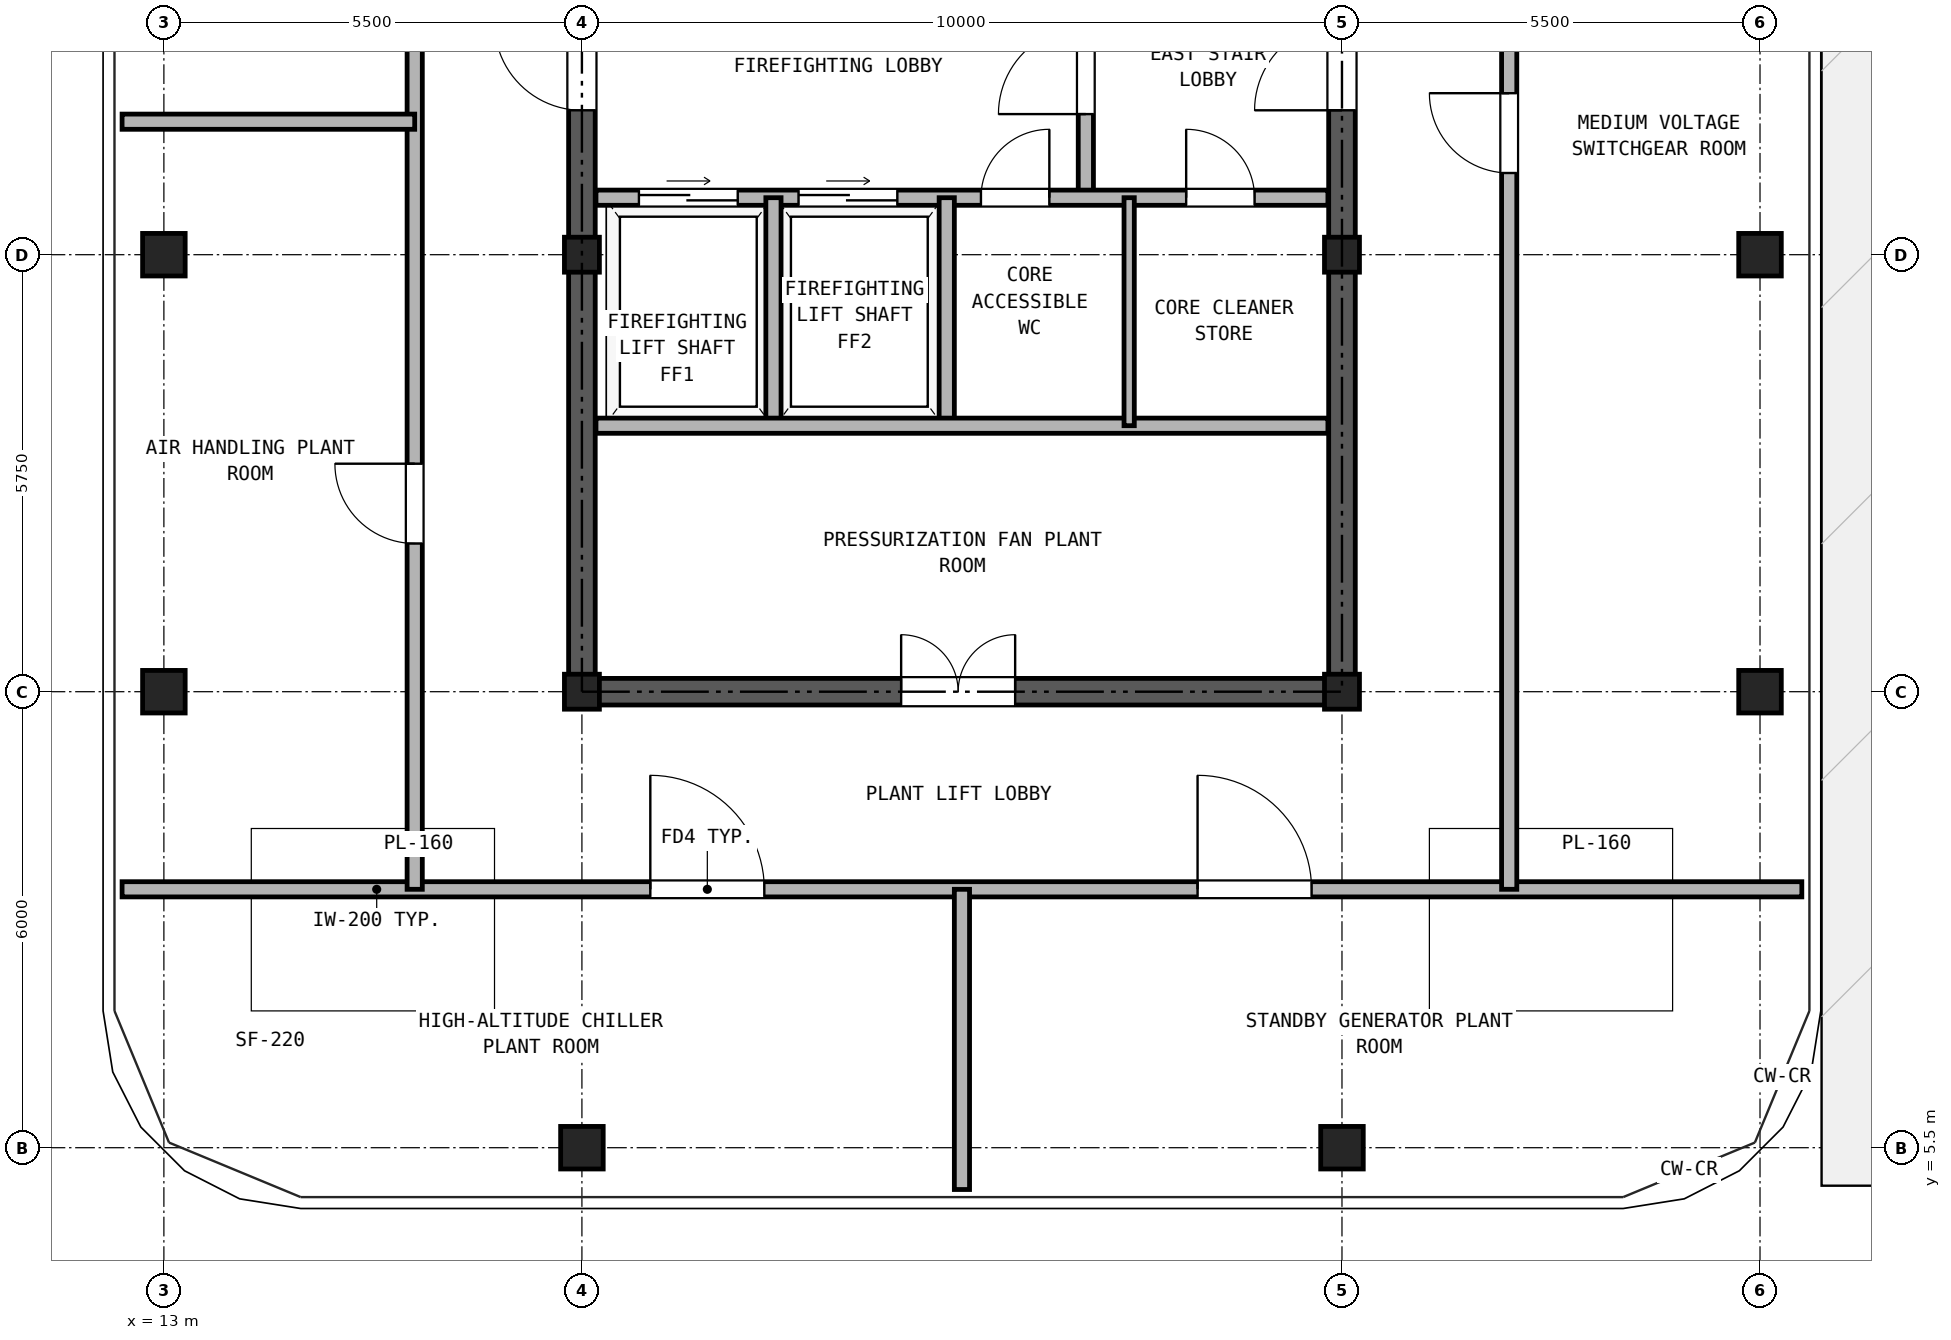
"""IFC4 building model, lengths in metres.
Left out: names, types, materials, properties, quantities, classifications, styles, units other than length and angle.
Written with IfcOpenShell. Run it as: python <this file> out.ifc"""

import sys

from ifc_helpers import new_model, si_unit, direction, frame, frame_2d, origin, origin_2d, place, context, subcontext, project, spatial, rectangle, hollow_rectangle, extrude, source, transform, mapped, element, fill, save


model = new_model("IFC4")
c1 = context("Model", 3, precision=1e-05, world=origin(), true_north=direction((0.0, 1.0)))
c2 = subcontext(c1, "Body", "Model", "MODEL_VIEW")
j1 = project(units=[si_unit("LENGTHUNIT", "METRE"), si_unit("PLANEANGLEUNIT", "RADIAN")], contexts=[c1])
p1 = place(None, origin())
s1 = spatial("IfcSite", under=j1, at=p1, CompositionType="ELEMENT")
p2 = place(p1, origin())
s2 = spatial("IfcBuilding", under=s1, at=p2, CompositionType="ELEMENT")
p3 = place(p2, frame((0.0, 0.0, 285.7)))
s3 = spatial("IfcBuildingStorey", under=s2, at=p3, CompositionType="ELEMENT", Elevation=285.7)
m1 = source(origin(), c2, "Body", "SweptSolid", [
    extrude(hollow_rectangle(XDim=0.56, YDim=0.56, WallThickness=0.03, at=origin_2d()), origin(), (0.0, 0.0, 1.0), 3.38),
])
for number, where, z_axis, x_axis in (
    (1, (18.5, 5.5, 0.0), (0.0, 0.0, 1.0), (1.0, 0.0, 0.0)),
    (2, (28.5, 5.5, 0.0), (0.0, 0.0, 1.0), (1.0, 0.0, 0.0)),
    (3, (13.0, 11.5, 0.0), (0.0, 0.0, 1.0), (1.0, 0.0, 0.0)),
    (4, (34.0, 11.5, 0.0), (0.0, 0.0, 1.0), (1.0, 0.0, 0.0)),
    (5, (13.0, 17.25, 0.0), (0.0, 0.0, 1.0), (1.0, 0.0, 0.0)),
    (6, (34.0, 17.25, 0.0), (0.0, 0.0, 1.0), (1.0, 0.0, 0.0)),
):
    element("IfcColumn", number, at=place(p3, frame(where, z_axis=z_axis, x_axis=x_axis)), inside=s3, PredefinedType="COLUMN", context=c2, shape_type="MappedRepresentation", body=[
        mapped(m1, transform((0.0, 0.0, 0.0), x_axis=(1.0, 0.0, 0.0), y_axis=(0.0, 1.0, 0.0), z_axis=(0.0, 0.0, 1.0), scale=1.0)),
    ])
m2 = source(origin(), c2, "Body", "SweptSolid", [
    extrude(hollow_rectangle(XDim=0.46, YDim=0.46, WallThickness=0.025, at=origin_2d()), origin(), (0.0, 0.0, 1.0), 3.38),
])
for number, where, z_axis, x_axis in (
    (7, (18.5, 11.5, 0.0), (0.0, 0.0, 1.0), (1.0, 0.0, 0.0)),
    (8, (18.5, 17.25, 0.0), (0.0, 0.0, 1.0), (1.0, 0.0, 0.0)),
    (9, (28.5, 11.5, 0.0), (0.0, 0.0, 1.0), (1.0, 0.0, 0.0)),
    (10, (28.5, 17.25, 0.0), (0.0, 0.0, 1.0), (1.0, 0.0, 0.0)),
):
    element("IfcColumn", number, at=place(p3, frame(where, z_axis=z_axis, x_axis=x_axis)), inside=s3, PredefinedType="COLUMN", context=c2, shape_type="MappedRepresentation", body=[
        mapped(m2, transform((0.0, 0.0, 0.0), x_axis=(1.0, 0.0, 0.0), y_axis=(0.0, 1.0, 0.0), z_axis=(0.0, 0.0, 1.0), scale=1.0)),
    ])
p4 = place(p3, frame((18.325, 11.5, 0.0), z_axis=(0.0, 0.0, 1.0), x_axis=(1.0, 0.0, 0.0)))
e11 = element("IfcWall", 11, at=p4, inside=s3, PredefinedType="SHEAR", context=c2, shape_type="SweptSolid", body=[
    extrude(rectangle(XDim=10.35, YDim=0.35, at=frame_2d((5.175, 0.0))), origin(), (0.0, 0.0, 1.0), 3.38),
])
p5 = place(p4, frame((4.375, 0.0, 0.0)))
e12 = element("IfcOpeningElement", 12, at=p5, cuts=e11, PredefinedType="OPENING", context=c2, shape_type="SweptSolid", body=[
    extrude(rectangle(XDim=1.5, YDim=2.25, at=frame_2d((0.75, 1.125))), frame((0.0, 0.185, 0.0), z_axis=(0.0, -1.0, 0.0), x_axis=(1.0, 0.0, 0.0)), (0.0, 0.0, 1.0), 0.37),
])
p6 = place(p3, frame((18.5, 11.675, 0.0), z_axis=(0.0, 0.0, 1.0), x_axis=(0.0, 1.0, 0.0)))
e13 = element("IfcWall", 13, at=p6, inside=s3, PredefinedType="SHEAR", context=c2, shape_type="SweptSolid", body=[
    extrude(rectangle(XDim=16.9, YDim=0.35, at=frame_2d((8.45, 0.0))), origin(), (0.0, 0.0, 1.0), 3.38),
])
p7 = place(p6, frame((7.475, 0.0, 0.0)))
e14 = element("IfcOpeningElement", 14, at=p7, cuts=e13, PredefinedType="OPENING", context=c2, shape_type="SweptSolid", body=[
    extrude(rectangle(XDim=1.15, YDim=2.2, at=frame_2d((0.575, 1.1))), frame((0.0, 0.185, 0.0), z_axis=(0.0, -1.0, 0.0), x_axis=(1.0, 0.0, 0.0)), (0.0, 0.0, 1.0), 0.37),
])
p8 = place(p3, frame((28.5, 11.675, 0.0), z_axis=(0.0, 0.0, 1.0), x_axis=(0.0, 1.0, 0.0)))
e15 = element("IfcWall", 15, at=p8, inside=s3, PredefinedType="SHEAR", context=c2, shape_type="SweptSolid", body=[
    extrude(rectangle(XDim=16.9, YDim=0.35, at=frame_2d((8.45, 0.0))), origin(), (0.0, 0.0, 1.0), 3.38),
])
p9 = place(p8, frame((7.475, 0.0, 0.0)))
e16 = element("IfcOpeningElement", 16, at=p9, cuts=e15, PredefinedType="OPENING", context=c2, shape_type="SweptSolid", body=[
    extrude(rectangle(XDim=1.15, YDim=2.2, at=frame_2d((0.575, 1.1))), frame((0.0, 0.185, 0.0), z_axis=(0.0, -1.0, 0.0), x_axis=(1.0, 0.0, 0.0)), (0.0, 0.0, 1.0), 0.37),
])
p10 = place(p3, frame((25.13, 18.0, 0.0), z_axis=(0.0, 0.0, 1.0), x_axis=(0.0, 1.0, 0.0)))
e17 = element("IfcWall", 17, at=p10, inside=s3, PredefinedType="PARTITIONING", context=c2, shape_type="SweptSolid", body=[
    extrude(rectangle(XDim=3.39, YDim=0.2, at=frame_2d((1.695, 0.0))), origin(), (0.0, 0.0, 1.0), 3.38),
])
p11 = place(p10, frame((1.1, 0.0, 0.0)))
e18 = element("IfcOpeningElement", 18, at=p11, cuts=e17, PredefinedType="OPENING", context=c2, shape_type="SweptSolid", body=[
    extrude(rectangle(XDim=1.15, YDim=2.2, at=frame_2d((0.575, 1.1))), frame((0.0, 0.11, 0.0), z_axis=(0.0, -1.0, 0.0), x_axis=(1.0, 0.0, 0.0)), (0.0, 0.0, 1.0), 0.22),
])
p12 = place(p3, frame((18.685, 18.0, 0.0), z_axis=(0.0, 0.0, 1.0), x_axis=(1.0, 0.0, 0.0)))
e19 = element("IfcWall", 19, at=p12, inside=s3, PredefinedType="PARTITIONING", context=c2, shape_type="SweptSolid", body=[
    extrude(rectangle(XDim=9.63, YDim=0.2, at=frame_2d((4.815, 0.0))), origin(), (0.0, 0.0, 1.0), 3.38),
])
p13 = place(p12, frame((0.565, 0.0, 0.0)))
e20 = element("IfcOpeningElement", 20, at=p13, cuts=e19, PredefinedType="OPENING", context=c2, shape_type="SweptSolid", body=[
    extrude(rectangle(XDim=1.3, YDim=2.3, at=frame_2d((0.65, 1.15))), frame((0.0, 0.11, 0.0), z_axis=(0.0, -1.0, 0.0), x_axis=(1.0, 0.0, 0.0)), (0.0, 0.0, 1.0), 0.22),
])
p14 = place(p12, frame((2.665, 0.0, 0.0)))
e21 = element("IfcOpeningElement", 21, at=p14, cuts=e19, PredefinedType="OPENING", context=c2, shape_type="SweptSolid", body=[
    extrude(rectangle(XDim=1.3, YDim=2.3, at=frame_2d((0.65, 1.15))), frame((0.0, 0.11, 0.0), z_axis=(0.0, -1.0, 0.0), x_axis=(1.0, 0.0, 0.0)), (0.0, 0.0, 1.0), 0.22),
])
p15 = place(p12, frame((5.065, 0.0, 0.0)))
e22 = element("IfcOpeningElement", 22, at=p15, cuts=e19, PredefinedType="OPENING", context=c2, shape_type="SweptSolid", body=[
    extrude(rectangle(XDim=0.9, YDim=2.05, at=frame_2d((0.45, 1.025))), frame((0.0, 0.11, 0.0), z_axis=(0.0, -1.0, 0.0), x_axis=(1.0, 0.0, 0.0)), (0.0, 0.0, 1.0), 0.22),
])
p16 = place(p12, frame((7.765, 0.0, 0.0)))
e23 = element("IfcOpeningElement", 23, at=p16, cuts=e19, PredefinedType="OPENING", context=c2, shape_type="SweptSolid", body=[
    extrude(rectangle(XDim=0.9, YDim=2.05, at=frame_2d((0.45, 1.025))), frame((0.0, 0.11, 0.0), z_axis=(0.0, -1.0, 0.0), x_axis=(1.0, 0.0, 0.0)), (0.0, 0.0, 1.0), 0.22),
])
for number, where, z_axis, x_axis in (
    (24, (21.02, 15.0, 0.0), (0.0, 0.0, 1.0), (0.0, 1.0, 0.0)),
    (25, (23.3, 15.0, 0.0), (0.0, 0.0, 1.0), (0.0, 1.0, 0.0)),
):
    element("IfcWall", number, at=place(p3, frame(where, z_axis=z_axis, x_axis=x_axis)), inside=s3, PredefinedType="PARTITIONING", context=c2, shape_type="SweptSolid", body=[
        extrude(rectangle(XDim=3.0, YDim=0.2, at=frame_2d((1.5, 0.0))), origin(), (0.0, 0.0, 1.0), 3.38),
    ])
p17 = place(p3, frame((18.685, 15.0, 0.0), z_axis=(0.0, 0.0, 1.0), x_axis=(1.0, 0.0, 0.0)))
e26 = element("IfcWall", 26, at=p17, inside=s3, PredefinedType="PARTITIONING", context=c2, shape_type="SweptSolid", body=[
    extrude(rectangle(XDim=9.63, YDim=0.2, at=frame_2d((4.815, 0.0))), origin(), (0.0, 0.0, 1.0), 3.38),
])
p18 = place(p3, frame((25.7, 15.0, 0.0), z_axis=(0.0, 0.0, 1.0), x_axis=(0.0, 1.0, 0.0)))
e27 = element("IfcWall", 27, at=p18, inside=s3, PredefinedType="PARTITIONING", context=c2, shape_type="SweptSolid", body=[
    extrude(rectangle(XDim=3.0, YDim=0.135, at=frame_2d((1.5, 0.0))), origin(), (0.0, 0.0, 1.0), 3.38),
])
p19 = place(p3, frame((12.45, 8.9, 0.0), z_axis=(0.0, 0.0, 1.0), x_axis=(1.0, 0.0, 0.0)))
e28 = element("IfcWall", 28, at=p19, inside=s3, PredefinedType="PARTITIONING", context=c2, shape_type="SweptSolid", body=[
    extrude(rectangle(XDim=22.1, YDim=0.2, at=frame_2d((11.05, 0.0))), origin(), (0.0, 0.0, 1.0), 3.38),
])
p20 = place(p19, frame((6.95, 0.0, 0.0)))
e29 = element("IfcOpeningElement", 29, at=p20, cuts=e28, PredefinedType="OPENING", context=c2, shape_type="SweptSolid", body=[
    extrude(rectangle(XDim=1.5, YDim=2.25, at=frame_2d((0.75, 1.125))), frame((0.0, 0.11, 0.0), z_axis=(0.0, -1.0, 0.0), x_axis=(1.0, 0.0, 0.0)), (0.0, 0.0, 1.0), 0.22),
])
p21 = place(p19, frame((14.15, 0.0, 0.0)))
e30 = element("IfcOpeningElement", 30, at=p21, cuts=e28, PredefinedType="OPENING", context=c2, shape_type="SweptSolid", body=[
    extrude(rectangle(XDim=1.5, YDim=2.25, at=frame_2d((0.75, 1.125))), frame((0.0, 0.11, 0.0), z_axis=(0.0, -1.0, 0.0), x_axis=(1.0, 0.0, 0.0)), (0.0, 0.0, 1.0), 0.22),
])
p22 = place(p3, frame((16.3, 8.9, 0.0), z_axis=(0.0, 0.0, 1.0), x_axis=(0.0, 1.0, 0.0)))
e31 = element("IfcWall", 31, at=p22, inside=s3, PredefinedType="PARTITIONING", context=c2, shape_type="SweptSolid", body=[
    extrude(rectangle(XDim=19.85, YDim=0.2, at=frame_2d((9.925, 0.0))), origin(), (0.0, 0.0, 1.0), 3.38),
])
p23 = place(p22, frame((4.55, 0.0, 0.0)))
e32 = element("IfcOpeningElement", 32, at=p23, cuts=e31, PredefinedType="OPENING", context=c2, shape_type="SweptSolid", body=[
    extrude(rectangle(XDim=1.05, YDim=2.15, at=frame_2d((0.525, 1.075))), frame((0.0, 0.11, 0.0), z_axis=(0.0, -1.0, 0.0), x_axis=(1.0, 0.0, 0.0)), (0.0, 0.0, 1.0), 0.22),
])
p24 = place(p22, frame((14.475, 0.0, 0.0)))
e33 = element("IfcOpeningElement", 33, at=p24, cuts=e31, PredefinedType="OPENING", context=c2, shape_type="SweptSolid", body=[
    extrude(rectangle(XDim=1.05, YDim=2.15, at=frame_2d((0.525, 1.075))), frame((0.0, 0.11, 0.0), z_axis=(0.0, -1.0, 0.0), x_axis=(1.0, 0.0, 0.0)), (0.0, 0.0, 1.0), 0.22),
])
p25 = place(p3, frame((30.7, 8.9, 0.0), z_axis=(0.0, 0.0, 1.0), x_axis=(0.0, 1.0, 0.0)))
e34 = element("IfcWall", 34, at=p25, inside=s3, PredefinedType="PARTITIONING", context=c2, shape_type="SweptSolid", body=[
    extrude(rectangle(XDim=19.85, YDim=0.2, at=frame_2d((9.925, 0.0))), origin(), (0.0, 0.0, 1.0), 3.38),
])
p26 = place(p25, frame((9.425, 0.0, 0.0)))
e35 = element("IfcOpeningElement", 35, at=p26, cuts=e34, PredefinedType="OPENING", context=c2, shape_type="SweptSolid", body=[
    extrude(rectangle(XDim=1.05, YDim=2.15, at=frame_2d((0.525, 1.075))), frame((0.0, 0.11, 0.0), z_axis=(0.0, -1.0, 0.0), x_axis=(1.0, 0.0, 0.0)), (0.0, 0.0, 1.0), 0.22),
])
p27 = place(p3, frame((23.5, 4.95, 0.0), z_axis=(0.0, 0.0, 1.0), x_axis=(0.0, 1.0, 0.0)))
e36 = element("IfcWall", 36, at=p27, inside=s3, PredefinedType="PARTITIONING", context=c2, shape_type="SweptSolid", body=[
    extrude(rectangle(XDim=3.95, YDim=0.2, at=frame_2d((1.975, 0.0))), origin(), (0.0, 0.0, 1.0), 3.38),
])
p28 = place(p3, frame((12.45, 19.0, 0.0), z_axis=(0.0, 0.0, 1.0), x_axis=(1.0, 0.0, 0.0)))
e37 = element("IfcWall", 37, at=p28, inside=s3, PredefinedType="PARTITIONING", context=c2, shape_type="SweptSolid", body=[
    extrude(rectangle(XDim=3.85, YDim=0.2, at=frame_2d((1.925, 0.0))), origin(), (0.0, 0.0, 1.0), 3.38),
])
p29 = place(p11, origin())
e38 = element("IfcDoor", 38, at=p29, inside=s3, OperationType="SINGLE_SWING_LEFT", PredefinedType="DOOR", context=c2, shape_type="SweptSolid", body=[
    extrude(rectangle(XDim=1.15, YDim=2.2, at=frame_2d((0.575, 1.1))), frame((0.0, 0.025, 0.0), z_axis=(0.0, -1.0, 0.0), x_axis=(1.0, 0.0, 0.0)), (0.0, 0.0, 1.0), 0.05),
])
fill(e18, e38)
p30 = place(p13, origin())
e39 = element("IfcDoor", 39, at=p30, inside=s3, OperationType="DOUBLE_DOOR_SLIDING", PredefinedType="DOOR", context=c2, shape_type="SweptSolid", body=[
    extrude(rectangle(XDim=1.3, YDim=2.3, at=frame_2d((0.65, 1.15))), frame((0.0, 0.025, 0.0), z_axis=(0.0, -1.0, 0.0), x_axis=(1.0, 0.0, 0.0)), (0.0, 0.0, 1.0), 0.05),
])
fill(e20, e39)
p31 = place(p14, origin())
e40 = element("IfcDoor", 40, at=p31, inside=s3, OperationType="DOUBLE_DOOR_SLIDING", PredefinedType="DOOR", context=c2, shape_type="SweptSolid", body=[
    extrude(rectangle(XDim=1.3, YDim=2.3, at=frame_2d((0.65, 1.15))), frame((0.0, 0.025, 0.0), z_axis=(0.0, -1.0, 0.0), x_axis=(1.0, 0.0, 0.0)), (0.0, 0.0, 1.0), 0.05),
])
fill(e21, e40)
p32 = place(p15, frame((0.9, 0.0, 0.0), z_axis=(0.0, 0.0, 1.0), x_axis=(-1.0, 0.0, 0.0)))
e41 = element("IfcDoor", 41, at=p32, inside=s3, OperationType="SINGLE_SWING_RIGHT", PredefinedType="DOOR", context=c2, shape_type="SweptSolid", body=[
    extrude(rectangle(XDim=0.9, YDim=2.05, at=frame_2d((0.45, 1.025))), frame((0.0, 0.025, 0.0), z_axis=(0.0, -1.0, 0.0), x_axis=(1.0, 0.0, 0.0)), (0.0, 0.0, 1.0), 0.05),
])
fill(e22, e41)
p33 = place(p16, frame((0.9, 0.0, 0.0), z_axis=(0.0, 0.0, 1.0), x_axis=(-1.0, 0.0, 0.0)))
e42 = element("IfcDoor", 42, at=p33, inside=s3, OperationType="SINGLE_SWING_LEFT", PredefinedType="DOOR", context=c2, shape_type="SweptSolid", body=[
    extrude(rectangle(XDim=0.9, YDim=2.05, at=frame_2d((0.45, 1.025))), frame((0.0, 0.025, 0.0), z_axis=(0.0, -1.0, 0.0), x_axis=(1.0, 0.0, 0.0)), (0.0, 0.0, 1.0), 0.05),
])
fill(e23, e42)
p34 = place(p7, frame((1.15, 0.0, 0.0), z_axis=(0.0, 0.0, 1.0), x_axis=(-1.0, 0.0, 0.0)))
e43 = element("IfcDoor", 43, at=p34, inside=s3, OperationType="SINGLE_SWING_RIGHT", PredefinedType="DOOR", context=c2, shape_type="SweptSolid", body=[
    extrude(rectangle(XDim=1.15, YDim=2.2, at=frame_2d((0.575, 1.1))), frame((0.0, 0.025, 0.0), z_axis=(0.0, -1.0, 0.0), x_axis=(1.0, 0.0, 0.0)), (0.0, 0.0, 1.0), 0.05),
])
fill(e14, e43)
p35 = place(p9, origin())
e44 = element("IfcDoor", 44, at=p35, inside=s3, OperationType="SINGLE_SWING_LEFT", PredefinedType="DOOR", context=c2, shape_type="SweptSolid", body=[
    extrude(rectangle(XDim=1.15, YDim=2.2, at=frame_2d((0.575, 1.1))), frame((0.0, 0.025, 0.0), z_axis=(0.0, -1.0, 0.0), x_axis=(1.0, 0.0, 0.0)), (0.0, 0.0, 1.0), 0.05),
])
fill(e16, e44)
p36 = place(p5, frame((1.5, 0.0, 0.0), z_axis=(0.0, 0.0, 1.0), x_axis=(-1.0, 0.0, 0.0)))
e45 = element("IfcDoor", 45, at=p36, inside=s3, OperationType="DOUBLE_DOOR_SINGLE_SWING", PredefinedType="DOOR", context=c2, shape_type="SweptSolid", body=[
    extrude(rectangle(XDim=1.5, YDim=2.25, at=frame_2d((0.75, 1.125))), frame((0.0, 0.025, 0.0), z_axis=(0.0, -1.0, 0.0), x_axis=(1.0, 0.0, 0.0)), (0.0, 0.0, 1.0), 0.05),
])
fill(e12, e45)
p37 = place(p20, frame((1.5, 0.0, 0.0), z_axis=(0.0, 0.0, 1.0), x_axis=(-1.0, 0.0, 0.0)))
e46 = element("IfcDoor", 46, at=p37, inside=s3, OperationType="SINGLE_SWING_LEFT", PredefinedType="DOOR", context=c2, shape_type="SweptSolid", body=[
    extrude(rectangle(XDim=1.5, YDim=2.25, at=frame_2d((0.75, 1.125))), frame((0.0, 0.025, 0.0), z_axis=(0.0, -1.0, 0.0), x_axis=(1.0, 0.0, 0.0)), (0.0, 0.0, 1.0), 0.05),
])
fill(e29, e46)
p38 = place(p21, frame((1.5, 0.0, 0.0), z_axis=(0.0, 0.0, 1.0), x_axis=(-1.0, 0.0, 0.0)))
e47 = element("IfcDoor", 47, at=p38, inside=s3, OperationType="SINGLE_SWING_LEFT", PredefinedType="DOOR", context=c2, shape_type="SweptSolid", body=[
    extrude(rectangle(XDim=1.5, YDim=2.25, at=frame_2d((0.75, 1.125))), frame((0.0, 0.025, 0.0), z_axis=(0.0, -1.0, 0.0), x_axis=(1.0, 0.0, 0.0)), (0.0, 0.0, 1.0), 0.05),
])
fill(e30, e47)
p39 = place(p23, frame((1.05, 0.0, 0.0), z_axis=(0.0, 0.0, 1.0), x_axis=(-1.0, 0.0, 0.0)))
e48 = element("IfcDoor", 48, at=p39, inside=s3, OperationType="SINGLE_SWING_RIGHT", PredefinedType="DOOR", context=c2, shape_type="SweptSolid", body=[
    extrude(rectangle(XDim=1.05, YDim=2.15, at=frame_2d((0.525, 1.075))), frame((0.0, 0.025, 0.0), z_axis=(0.0, -1.0, 0.0), x_axis=(1.0, 0.0, 0.0)), (0.0, 0.0, 1.0), 0.05),
])
fill(e32, e48)
p40 = place(p26, origin())
e49 = element("IfcDoor", 49, at=p40, inside=s3, OperationType="SINGLE_SWING_RIGHT", PredefinedType="DOOR", context=c2, shape_type="SweptSolid", body=[
    extrude(rectangle(XDim=1.05, YDim=2.15, at=frame_2d((0.525, 1.075))), frame((0.0, 0.025, 0.0), z_axis=(0.0, -1.0, 0.0), x_axis=(1.0, 0.0, 0.0)), (0.0, 0.0, 1.0), 0.05),
])
fill(e35, e49)
save(model, sys.argv[1])
